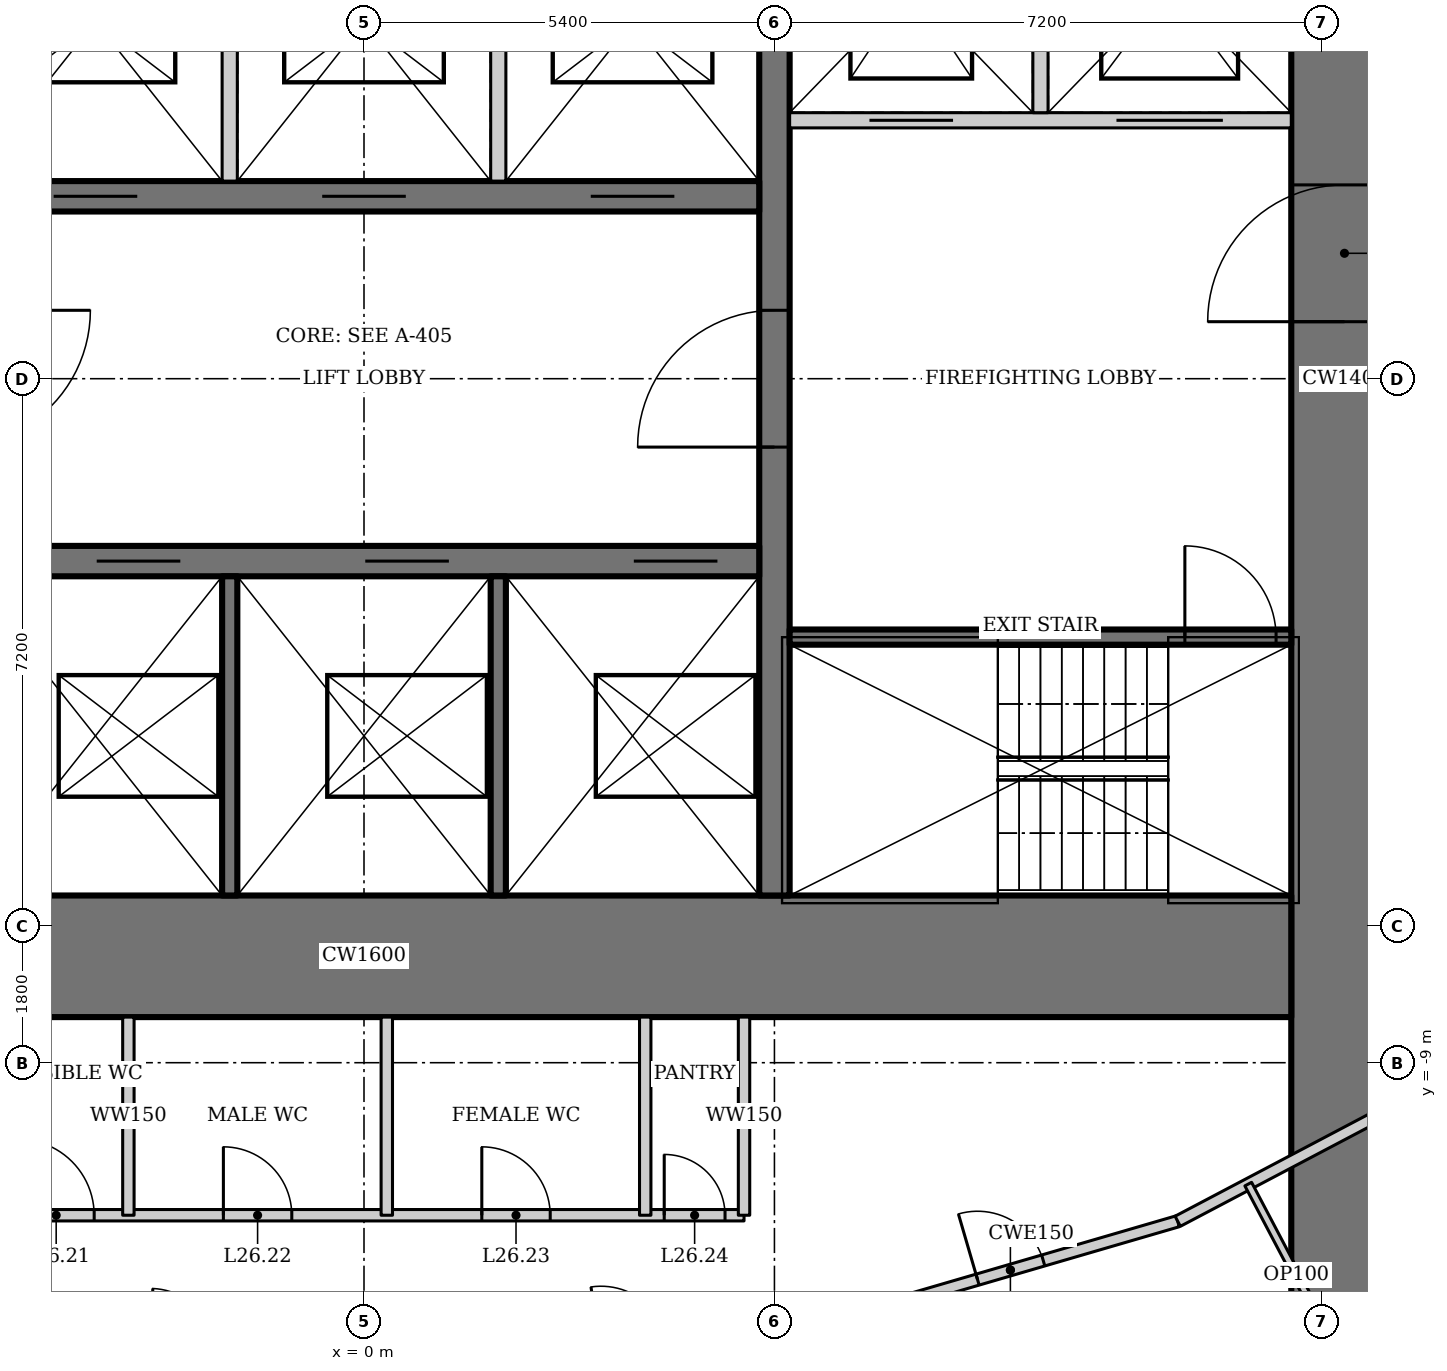
"""IFC4 building model, lengths in metres.
Left out: names, types, materials, properties, quantities, classifications, styles, units other than length and angle.
Written with IfcOpenShell. Run it as: python <this file> out.ifc"""

import sys

from ifc_helpers import new_model, si_unit, direction, frame, frame_2d, origin, place, context, subcontext, project, spatial, rectangle, extrude, element, fill, save


model = new_model("IFC4")
c1 = context("Model", 3, precision=1e-05, world=origin(), true_north=direction((0.0, 1.0)))
c2 = subcontext(c1, "Body", "Model", "MODEL_VIEW")
j1 = project(units=[si_unit("LENGTHUNIT", "METRE"), si_unit("PLANEANGLEUNIT", "RADIAN")], contexts=[c1])
p1 = place(None, origin())
s1 = spatial("IfcSite", under=j1, at=p1, CompositionType="ELEMENT")
p2 = place(p1, origin())
s2 = spatial("IfcBuilding", under=s1, at=p2, CompositionType="ELEMENT")
p3 = place(p2, frame((0.0, 0.0, 111.4)))
s3 = spatial("IfcBuildingStorey", under=s2, at=p3, CompositionType="ELEMENT", Elevation=111.4)
p4 = place(p3, frame((12.9, -13.0, 0.0), z_axis=(0.0, 0.0, 1.0), x_axis=(0.0, 1.0, 0.0)))
e1 = element("IfcWall", 1, at=p4, inside=s3, PredefinedType="SHEAR", context=c2, shape_type="SweptSolid", body=[
    extrude(rectangle(XDim=26.0, YDim=1.4, at=frame_2d((13.0, 0.0))), origin(), (0.0, 0.0, 1.0), 6.0),
])
p5 = place(p4, frame((13.75, 0.0, 0.0)))
e2 = element("IfcOpeningElement", 2, at=p5, cuts=e1, PredefinedType="OPENING", context=c2, shape_type="SweptSolid", body=[
    extrude(rectangle(XDim=1.8, YDim=2.1, at=frame_2d((0.9, 1.05))), frame((0.0, 0.71, 0.0), z_axis=(0.0, -1.0, 0.0), x_axis=(1.0, 0.0, 0.0)), (0.0, 0.0, 1.0), 1.42),
])
p6 = place(p3, frame((-12.2, -7.6, 0.0), z_axis=(0.0, 0.0, 1.0), x_axis=(1.0, 0.0, 0.0)))
e3 = element("IfcWall", 3, at=p6, inside=s3, PredefinedType="SHEAR", context=c2, shape_type="SweptSolid", body=[
    extrude(rectangle(XDim=24.4, YDim=1.6, at=frame_2d((12.2, 0.0))), origin(), (0.0, 0.0, 1.0), 6.0),
])
p7 = place(p3, frame((5.4, -6.8, 0.0), z_axis=(0.0, 0.0, 1.0), x_axis=(0.0, 1.0, 0.0)))
e4 = element("IfcWall", 4, at=p7, inside=s3, PredefinedType="SHEAR", context=c2, shape_type="SweptSolid", body=[
    extrude(rectangle(XDim=13.6, YDim=0.4, at=frame_2d((6.8, 0.0))), origin(), (0.0, 0.0, 1.0), 6.0),
])
p8 = place(p7, frame((5.9, 0.0, 0.0)))
e5 = element("IfcOpeningElement", 5, at=p8, cuts=e4, PredefinedType="OPENING", context=c2, shape_type="SweptSolid", body=[
    extrude(rectangle(XDim=1.8, YDim=2.1, at=frame_2d((0.9, 1.05))), frame((0.0, 0.21, 0.0), z_axis=(0.0, -1.0, 0.0), x_axis=(1.0, 0.0, 0.0)), (0.0, 0.0, 1.0), 0.42),
])
p9 = place(p3, frame((-5.2, -2.4, 0.0), z_axis=(0.0, 0.0, 1.0), x_axis=(1.0, 0.0, 0.0)))
e6 = element("IfcWall", 6, at=p9, inside=s3, PredefinedType="SHEAR", context=c2, shape_type="SweptSolid", body=[
    extrude(rectangle(XDim=10.4, YDim=0.4, at=frame_2d((5.2, 0.0))), origin(), (0.0, 0.0, 1.0), 6.0),
])
p10 = place(p9, frame((1.683, 0.0, 0.0)))
e7 = element("IfcOpeningElement", 7, at=p10, cuts=e6, PredefinedType="OPENING", context=c2, shape_type="SweptSolid", body=[
    extrude(rectangle(XDim=1.1, YDim=2.2, at=frame_2d((0.55, 1.1))), frame((0.0, 0.21, 0.0), z_axis=(0.0, -1.0, 0.0), x_axis=(1.0, 0.0, 0.0)), (0.0, 0.0, 1.0), 0.42),
])
p11 = place(p9, frame((5.217, 0.0, 0.0)))
e8 = element("IfcOpeningElement", 8, at=p11, cuts=e6, PredefinedType="OPENING", context=c2, shape_type="SweptSolid", body=[
    extrude(rectangle(XDim=1.1, YDim=2.2, at=frame_2d((0.55, 1.1))), frame((0.0, 0.21, 0.0), z_axis=(0.0, -1.0, 0.0), x_axis=(1.0, 0.0, 0.0)), (0.0, 0.0, 1.0), 0.42),
])
p12 = place(p9, frame((8.75, 0.0, 0.0)))
e9 = element("IfcOpeningElement", 9, at=p12, cuts=e6, PredefinedType="OPENING", context=c2, shape_type="SweptSolid", body=[
    extrude(rectangle(XDim=1.1, YDim=2.2, at=frame_2d((0.55, 1.1))), frame((0.0, 0.21, 0.0), z_axis=(0.0, -1.0, 0.0), x_axis=(1.0, 0.0, 0.0)), (0.0, 0.0, 1.0), 0.42),
])
for number, where, z_axis, x_axis in (
    (10, (-1.767, -2.6, 0.0), (0.0, 0.0, 1.0), (0.0, -1.0, 0.0)),
    (11, (1.767, -2.6, 0.0), (0.0, 0.0, 1.0), (0.0, -1.0, 0.0)),
):
    element("IfcWall", number, at=place(p3, frame(where, z_axis=z_axis, x_axis=x_axis)), inside=s3, PredefinedType="SOLIDWALL", context=c2, shape_type="SweptSolid", body=[
        extrude(rectangle(XDim=4.2, YDim=0.2, at=frame_2d((2.1, 0.0))), origin(), (0.0, 0.0, 1.0), 6.0),
    ])
p13 = place(p3, frame((5.2, 2.4, 0.0), z_axis=(0.0, 0.0, 1.0), x_axis=(-1.0, 0.0, 0.0)))
e12 = element("IfcWall", 12, at=p13, inside=s3, PredefinedType="SHEAR", context=c2, shape_type="SweptSolid", body=[
    extrude(rectangle(XDim=10.4, YDim=0.4, at=frame_2d((5.2, 0.0))), origin(), (0.0, 0.0, 1.0), 6.0),
])
p14 = place(p13, frame((8.183, 0.0, 0.0)))
e13 = element("IfcOpeningElement", 13, at=p14, cuts=e12, PredefinedType="OPENING", context=c2, shape_type="SweptSolid", body=[
    extrude(rectangle(XDim=1.1, YDim=2.2, at=frame_2d((0.55, 1.1))), frame((0.0, 0.21, 0.0), z_axis=(0.0, -1.0, 0.0), x_axis=(1.0, 0.0, 0.0)), (0.0, 0.0, 1.0), 0.42),
])
p15 = place(p13, frame((4.65, 0.0, 0.0)))
e14 = element("IfcOpeningElement", 14, at=p15, cuts=e12, PredefinedType="OPENING", context=c2, shape_type="SweptSolid", body=[
    extrude(rectangle(XDim=1.1, YDim=2.2, at=frame_2d((0.55, 1.1))), frame((0.0, 0.21, 0.0), z_axis=(0.0, -1.0, 0.0), x_axis=(1.0, 0.0, 0.0)), (0.0, 0.0, 1.0), 0.42),
])
p16 = place(p13, frame((1.117, 0.0, 0.0)))
e15 = element("IfcOpeningElement", 15, at=p16, cuts=e12, PredefinedType="OPENING", context=c2, shape_type="SweptSolid", body=[
    extrude(rectangle(XDim=1.1, YDim=2.2, at=frame_2d((0.55, 1.1))), frame((0.0, 0.21, 0.0), z_axis=(0.0, -1.0, 0.0), x_axis=(1.0, 0.0, 0.0)), (0.0, 0.0, 1.0), 0.42),
])
for number, where, z_axis, x_axis in (
    (16, (-1.767, 2.6, 0.0), (0.0, 0.0, 1.0), (0.0, 1.0, 0.0)),
    (17, (1.767, 2.6, 0.0), (0.0, 0.0, 1.0), (0.0, 1.0, 0.0)),
):
    element("IfcWall", number, at=place(p3, frame(where, z_axis=z_axis, x_axis=x_axis)), inside=s3, PredefinedType="SOLIDWALL", context=c2, shape_type="SweptSolid", body=[
        extrude(rectangle(XDim=4.2, YDim=0.2, at=frame_2d((2.1, 0.0))), origin(), (0.0, 0.0, 1.0), 6.0),
    ])
p17 = place(p3, frame((5.6, -3.4, 0.0), z_axis=(0.0, 0.0, 1.0), x_axis=(1.0, 0.0, 0.0)))
e18 = element("IfcWall", 18, at=p17, inside=s3, PredefinedType="SHEAR", context=c2, shape_type="SweptSolid", body=[
    extrude(rectangle(XDim=6.6, YDim=0.2, at=frame_2d((3.3, 0.0))), origin(), (0.0, 0.0, 1.0), 6.0),
])
p18 = place(p17, frame((5.2, 0.0, 0.0)))
e19 = element("IfcOpeningElement", 19, at=p18, cuts=e18, PredefinedType="OPENING", context=c2, shape_type="SweptSolid", body=[
    extrude(rectangle(XDim=1.2, YDim=2.1, at=frame_2d((0.6, 1.05))), frame((0.0, 0.11, 0.0), z_axis=(0.0, -1.0, 0.0), x_axis=(1.0, 0.0, 0.0)), (0.0, 0.0, 1.0), 0.22),
])
p19 = place(p3, frame((12.2, 3.4, 0.0), z_axis=(0.0, 0.0, 1.0), x_axis=(-1.0, 0.0, 0.0)))
e20 = element("IfcWall", 20, at=p19, inside=s3, PredefinedType="SOLIDWALL", context=c2, shape_type="SweptSolid", body=[
    extrude(rectangle(XDim=6.6, YDim=0.2, at=frame_2d((3.3, 0.0))), origin(), (0.0, 0.0, 1.0), 6.0),
])
p20 = place(p19, frame((4.45, 0.0, 0.0)))
e21 = element("IfcOpeningElement", 21, at=p20, cuts=e20, PredefinedType="OPENING", context=c2, shape_type="SweptSolid", body=[
    extrude(rectangle(XDim=1.1, YDim=2.2, at=frame_2d((0.55, 1.1))), frame((0.0, 0.11, 0.0), z_axis=(0.0, -1.0, 0.0), x_axis=(1.0, 0.0, 0.0)), (0.0, 0.0, 1.0), 0.22),
])
p21 = place(p19, frame((0.9, 0.0, 0.0)))
e22 = element("IfcOpeningElement", 22, at=p21, cuts=e20, PredefinedType="OPENING", context=c2, shape_type="SweptSolid", body=[
    extrude(rectangle(XDim=1.4, YDim=2.2, at=frame_2d((0.7, 1.1))), frame((0.0, 0.11, 0.0), z_axis=(0.0, -1.0, 0.0), x_axis=(1.0, 0.0, 0.0)), (0.0, 0.0, 1.0), 0.22),
])
p22 = place(p3, frame((8.9, 3.5, 0.0), z_axis=(0.0, 0.0, 1.0), x_axis=(0.0, 1.0, 0.0)))
e23 = element("IfcWall", 23, at=p22, inside=s3, PredefinedType="SOLIDWALL", context=c2, shape_type="SweptSolid", body=[
    extrude(rectangle(XDim=3.3, YDim=0.2, at=frame_2d((1.65, 0.0))), origin(), (0.0, 0.0, 1.0), 6.0),
])
p23 = place(p3, frame((6.303, -12.37, 0.0), z_axis=(0.0, 0.0, 1.0), x_axis=(0.96001728753, 0.279940721659, 0.0)))
e24 = element("IfcWall", 24, at=p23, inside=s3, PredefinedType="PARTITIONING", context=c2, shape_type="SweptSolid", body=[
    extrude(rectangle(XDim=4.586, YDim=0.15, at=frame_2d((2.293, 0.0))), origin(), (0.0, 0.0, 1.0), 5.85),
])
p24 = place(p23, frame((1.843, 0.0, 0.0)))
e25 = element("IfcOpeningElement", 25, at=p24, cuts=e24, PredefinedType="OPENING", context=c2, shape_type="SweptSolid", body=[
    extrude(rectangle(XDim=0.9, YDim=2.1, at=frame_2d((0.45, 1.05))), frame((0.0, 0.085, 0.0), z_axis=(0.0, -1.0, 0.0), x_axis=(1.0, 0.0, 0.0)), (0.0, 0.0, 1.0), 0.17),
])
p25 = place(p3, frame((10.706, -11.086, 0.0), z_axis=(0.0, 0.0, 1.0), x_axis=(0.884643590306, 0.466267860924, 0.0)))
e26 = element("IfcWall", 26, at=p25, inside=s3, PredefinedType="PARTITIONING", context=c2, shape_type="SweptSolid", body=[
    extrude(rectangle(XDim=5.113, YDim=0.15, at=frame_2d((2.557, 0.0))), origin(), (0.0, 0.0, 1.0), 5.85),
])
p26 = place(p3, frame((-5.0, -11.007, 0.0), z_axis=(0.0, 0.0, 1.0), x_axis=(1.0, 0.0, 0.0)))
e27 = element("IfcWall", 27, at=p26, inside=s3, PredefinedType="SOLIDWALL", context=c2, shape_type="SweptSolid", body=[
    extrude(rectangle(XDim=10.0, YDim=0.15, at=frame_2d((5.0, 0.0))), origin(), (0.0, 0.0, 1.0), 5.85),
])
p27 = place(p26, frame((0.45, 0.0, 0.0)))
e28 = element("IfcOpeningElement", 28, at=p27, cuts=e27, PredefinedType="OPENING", context=c2, shape_type="SweptSolid", body=[
    extrude(rectangle(XDim=1.0, YDim=2.1, at=frame_2d((0.5, 1.05))), frame((0.0, 0.085, 0.0), z_axis=(0.0, -1.0, 0.0), x_axis=(1.0, 0.0, 0.0)), (0.0, 0.0, 1.0), 0.17),
])
p28 = place(p26, frame((3.15, 0.0, 0.0)))
e29 = element("IfcOpeningElement", 29, at=p28, cuts=e27, PredefinedType="OPENING", context=c2, shape_type="SweptSolid", body=[
    extrude(rectangle(XDim=0.9, YDim=2.1, at=frame_2d((0.45, 1.05))), frame((0.0, 0.085, 0.0), z_axis=(0.0, -1.0, 0.0), x_axis=(1.0, 0.0, 0.0)), (0.0, 0.0, 1.0), 0.17),
])
p29 = place(p26, frame((6.55, 0.0, 0.0)))
e30 = element("IfcOpeningElement", 30, at=p29, cuts=e27, PredefinedType="OPENING", context=c2, shape_type="SweptSolid", body=[
    extrude(rectangle(XDim=0.9, YDim=2.1, at=frame_2d((0.45, 1.05))), frame((0.0, 0.085, 0.0), z_axis=(0.0, -1.0, 0.0), x_axis=(1.0, 0.0, 0.0)), (0.0, 0.0, 1.0), 0.17),
])
p30 = place(p26, frame((8.95, 0.0, 0.0)))
e31 = element("IfcOpeningElement", 31, at=p30, cuts=e27, PredefinedType="OPENING", context=c2, shape_type="SweptSolid", body=[
    extrude(rectangle(XDim=0.8, YDim=2.1, at=frame_2d((0.4, 1.05))), frame((0.0, 0.085, 0.0), z_axis=(0.0, -1.0, 0.0), x_axis=(1.0, 0.0, 0.0)), (0.0, 0.0, 1.0), 0.17),
])
for number, where, z_axis, x_axis in (
    (32, (5.0, -8.4, 0.0), (0.0, 0.0, 1.0), (0.0, -1.0, 0.0)),
    (33, (-3.1, -8.4, 0.0), (0.0, 0.0, 1.0), (0.0, -1.0, 0.0)),
):
    element("IfcWall", number, at=place(p3, frame(where, z_axis=z_axis, x_axis=x_axis)), inside=s3, PredefinedType="SOLIDWALL", context=c2, shape_type="SweptSolid", body=[
        extrude(rectangle(XDim=2.607, YDim=0.15, at=frame_2d((1.304, 0.0))), origin(), (0.0, 0.0, 1.0), 5.85),
    ])
p31 = place(p3, frame((0.3, -8.4, 0.0), z_axis=(0.0, 0.0, 1.0), x_axis=(0.0, -1.0, 0.0)))
e34 = element("IfcWall", 34, at=p31, inside=s3, PredefinedType="SOLIDWALL", context=c2, shape_type="SweptSolid", body=[
    extrude(rectangle(XDim=2.607, YDim=0.15, at=frame_2d((1.304, 0.0))), origin(), (0.0, 0.0, 1.0), 4.65),
])
p32 = place(p3, frame((3.7, -8.4, 0.0), z_axis=(0.0, 0.0, 1.0), x_axis=(0.0, -1.0, 0.0)))
e35 = element("IfcWall", 35, at=p32, inside=s3, PredefinedType="SOLIDWALL", context=c2, shape_type="SweptSolid", body=[
    extrude(rectangle(XDim=2.607, YDim=0.15, at=frame_2d((1.304, 0.0))), origin(), (0.0, 0.0, 1.0), 5.85),
])
p33 = place(p3, frame((12.9, -13.0, 0.0), z_axis=(0.0, 0.0, 1.0), x_axis=(-0.466205800243, 0.884676297761, 0.0)))
e36 = element("IfcWall", 36, at=p33, inside=s3, PredefinedType="PARTITIONING", context=c2, shape_type="SweptSolid", body=[
    extrude(rectangle(XDim=2.716, YDim=0.1, at=frame_2d((1.358, 0.0))), origin(), (0.0, 0.0, 1.0), 5.85),
])
p34 = place(p8, origin())
e37 = element("IfcDoor", 37, at=p34, inside=s3, OperationType="DOUBLE_DOOR_DOUBLE_SWING", PredefinedType="DOOR", context=c2, shape_type="SweptSolid", body=[
    extrude(rectangle(XDim=1.8, YDim=2.1, at=frame_2d((0.9, 1.05))), frame((0.0, 0.025, 0.0), z_axis=(0.0, -1.0, 0.0), x_axis=(1.0, 0.0, 0.0)), (0.0, 0.0, 1.0), 0.05),
])
fill(e5, e37)
p35 = place(p18, origin())
e38 = element("IfcDoor", 38, at=p35, inside=s3, OperationType="SINGLE_SWING_RIGHT", PredefinedType="DOOR", context=c2, shape_type="SweptSolid", body=[
    extrude(rectangle(XDim=1.2, YDim=2.1, at=frame_2d((0.6, 1.05))), frame((0.0, 0.025, 0.0), z_axis=(0.0, -1.0, 0.0), x_axis=(1.0, 0.0, 0.0)), (0.0, 0.0, 1.0), 0.05),
])
fill(e19, e38)
p36 = place(p5, origin())
e39 = element("IfcDoor", 39, at=p36, inside=s3, OperationType="DOUBLE_DOOR_DOUBLE_SWING", PredefinedType="DOOR", context=c2, shape_type="SweptSolid", body=[
    extrude(rectangle(XDim=1.8, YDim=2.1, at=frame_2d((0.9, 1.05))), frame((0.0, 0.025, 0.0), z_axis=(0.0, -1.0, 0.0), x_axis=(1.0, 0.0, 0.0)), (0.0, 0.0, 1.0), 0.05),
])
fill(e2, e39)
p37 = place(p14, origin())
e40 = element("IfcDoor", 40, at=p37, inside=s3, OperationType="DOUBLE_DOOR_SLIDING", PredefinedType="DOOR", context=c2, shape_type="SweptSolid", body=[
    extrude(rectangle(XDim=1.1, YDim=2.2, at=frame_2d((0.55, 1.1))), frame((0.0, 0.025, 0.0), z_axis=(0.0, -1.0, 0.0), x_axis=(1.0, 0.0, 0.0)), (0.0, 0.0, 1.0), 0.05),
])
fill(e13, e40)
p38 = place(p10, origin())
e41 = element("IfcDoor", 41, at=p38, inside=s3, OperationType="DOUBLE_DOOR_SLIDING", PredefinedType="DOOR", context=c2, shape_type="SweptSolid", body=[
    extrude(rectangle(XDim=1.1, YDim=2.2, at=frame_2d((0.55, 1.1))), frame((0.0, 0.025, 0.0), z_axis=(0.0, -1.0, 0.0), x_axis=(1.0, 0.0, 0.0)), (0.0, 0.0, 1.0), 0.05),
])
fill(e7, e41)
p39 = place(p15, origin())
e42 = element("IfcDoor", 42, at=p39, inside=s3, OperationType="DOUBLE_DOOR_SLIDING", PredefinedType="DOOR", context=c2, shape_type="SweptSolid", body=[
    extrude(rectangle(XDim=1.1, YDim=2.2, at=frame_2d((0.55, 1.1))), frame((0.0, 0.025, 0.0), z_axis=(0.0, -1.0, 0.0), x_axis=(1.0, 0.0, 0.0)), (0.0, 0.0, 1.0), 0.05),
])
fill(e14, e42)
p40 = place(p11, origin())
e43 = element("IfcDoor", 43, at=p40, inside=s3, OperationType="DOUBLE_DOOR_SLIDING", PredefinedType="DOOR", context=c2, shape_type="SweptSolid", body=[
    extrude(rectangle(XDim=1.1, YDim=2.2, at=frame_2d((0.55, 1.1))), frame((0.0, 0.025, 0.0), z_axis=(0.0, -1.0, 0.0), x_axis=(1.0, 0.0, 0.0)), (0.0, 0.0, 1.0), 0.05),
])
fill(e8, e43)
p41 = place(p16, origin())
e44 = element("IfcDoor", 44, at=p41, inside=s3, OperationType="DOUBLE_DOOR_SLIDING", PredefinedType="DOOR", context=c2, shape_type="SweptSolid", body=[
    extrude(rectangle(XDim=1.1, YDim=2.2, at=frame_2d((0.55, 1.1))), frame((0.0, 0.025, 0.0), z_axis=(0.0, -1.0, 0.0), x_axis=(1.0, 0.0, 0.0)), (0.0, 0.0, 1.0), 0.05),
])
fill(e15, e44)
p42 = place(p12, origin())
e45 = element("IfcDoor", 45, at=p42, inside=s3, OperationType="DOUBLE_DOOR_SLIDING", PredefinedType="DOOR", context=c2, shape_type="SweptSolid", body=[
    extrude(rectangle(XDim=1.1, YDim=2.2, at=frame_2d((0.55, 1.1))), frame((0.0, 0.025, 0.0), z_axis=(0.0, -1.0, 0.0), x_axis=(1.0, 0.0, 0.0)), (0.0, 0.0, 1.0), 0.05),
])
fill(e9, e45)
p43 = place(p20, origin())
e46 = element("IfcDoor", 46, at=p43, inside=s3, OperationType="DOUBLE_DOOR_SLIDING", PredefinedType="DOOR", context=c2, shape_type="SweptSolid", body=[
    extrude(rectangle(XDim=1.1, YDim=2.2, at=frame_2d((0.55, 1.1))), frame((0.0, 0.025, 0.0), z_axis=(0.0, -1.0, 0.0), x_axis=(1.0, 0.0, 0.0)), (0.0, 0.0, 1.0), 0.05),
])
fill(e21, e46)
p44 = place(p21, origin())
e47 = element("IfcDoor", 47, at=p44, inside=s3, OperationType="DOUBLE_DOOR_SLIDING", PredefinedType="DOOR", context=c2, shape_type="SweptSolid", body=[
    extrude(rectangle(XDim=1.4, YDim=2.2, at=frame_2d((0.7, 1.1))), frame((0.0, 0.025, 0.0), z_axis=(0.0, -1.0, 0.0), x_axis=(1.0, 0.0, 0.0)), (0.0, 0.0, 1.0), 0.05),
])
fill(e22, e47)
p45 = place(p27, origin())
e48 = element("IfcDoor", 48, at=p45, inside=s3, OperationType="SINGLE_SWING_LEFT", PredefinedType="DOOR", context=c2, shape_type="SweptSolid", body=[
    extrude(rectangle(XDim=1.0, YDim=2.1, at=frame_2d((0.5, 1.05))), frame((0.0, 0.025, 0.0), z_axis=(0.0, -1.0, 0.0), x_axis=(1.0, 0.0, 0.0)), (0.0, 0.0, 1.0), 0.05),
])
fill(e28, e48)
p46 = place(p28, origin())
e49 = element("IfcDoor", 49, at=p46, inside=s3, OperationType="SINGLE_SWING_LEFT", PredefinedType="DOOR", context=c2, shape_type="SweptSolid", body=[
    extrude(rectangle(XDim=0.9, YDim=2.1, at=frame_2d((0.45, 1.05))), frame((0.0, 0.025, 0.0), z_axis=(0.0, -1.0, 0.0), x_axis=(1.0, 0.0, 0.0)), (0.0, 0.0, 1.0), 0.05),
])
fill(e29, e49)
p47 = place(p29, origin())
e50 = element("IfcDoor", 50, at=p47, inside=s3, OperationType="SINGLE_SWING_LEFT", PredefinedType="DOOR", context=c2, shape_type="SweptSolid", body=[
    extrude(rectangle(XDim=0.9, YDim=2.1, at=frame_2d((0.45, 1.05))), frame((0.0, 0.025, 0.0), z_axis=(0.0, -1.0, 0.0), x_axis=(1.0, 0.0, 0.0)), (0.0, 0.0, 1.0), 0.05),
])
fill(e30, e50)
p48 = place(p30, origin())
e51 = element("IfcDoor", 51, at=p48, inside=s3, OperationType="SINGLE_SWING_LEFT", PredefinedType="DOOR", context=c2, shape_type="SweptSolid", body=[
    extrude(rectangle(XDim=0.8, YDim=2.1, at=frame_2d((0.4, 1.05))), frame((0.0, 0.025, 0.0), z_axis=(0.0, -1.0, 0.0), x_axis=(1.0, 0.0, 0.0)), (0.0, 0.0, 1.0), 0.05),
])
fill(e31, e51)
p49 = place(p24, origin())
e52 = element("IfcDoor", 52, at=p49, inside=s3, OperationType="SINGLE_SWING_LEFT", PredefinedType="DOOR", context=c2, shape_type="SweptSolid", body=[
    extrude(rectangle(XDim=0.9, YDim=2.1, at=frame_2d((0.45, 1.05))), frame((0.0, 0.025, 0.0), z_axis=(0.0, -1.0, 0.0), x_axis=(1.0, 0.0, 0.0)), (0.0, 0.0, 1.0), 0.05),
])
fill(e25, e52)
save(model, sys.argv[1])
